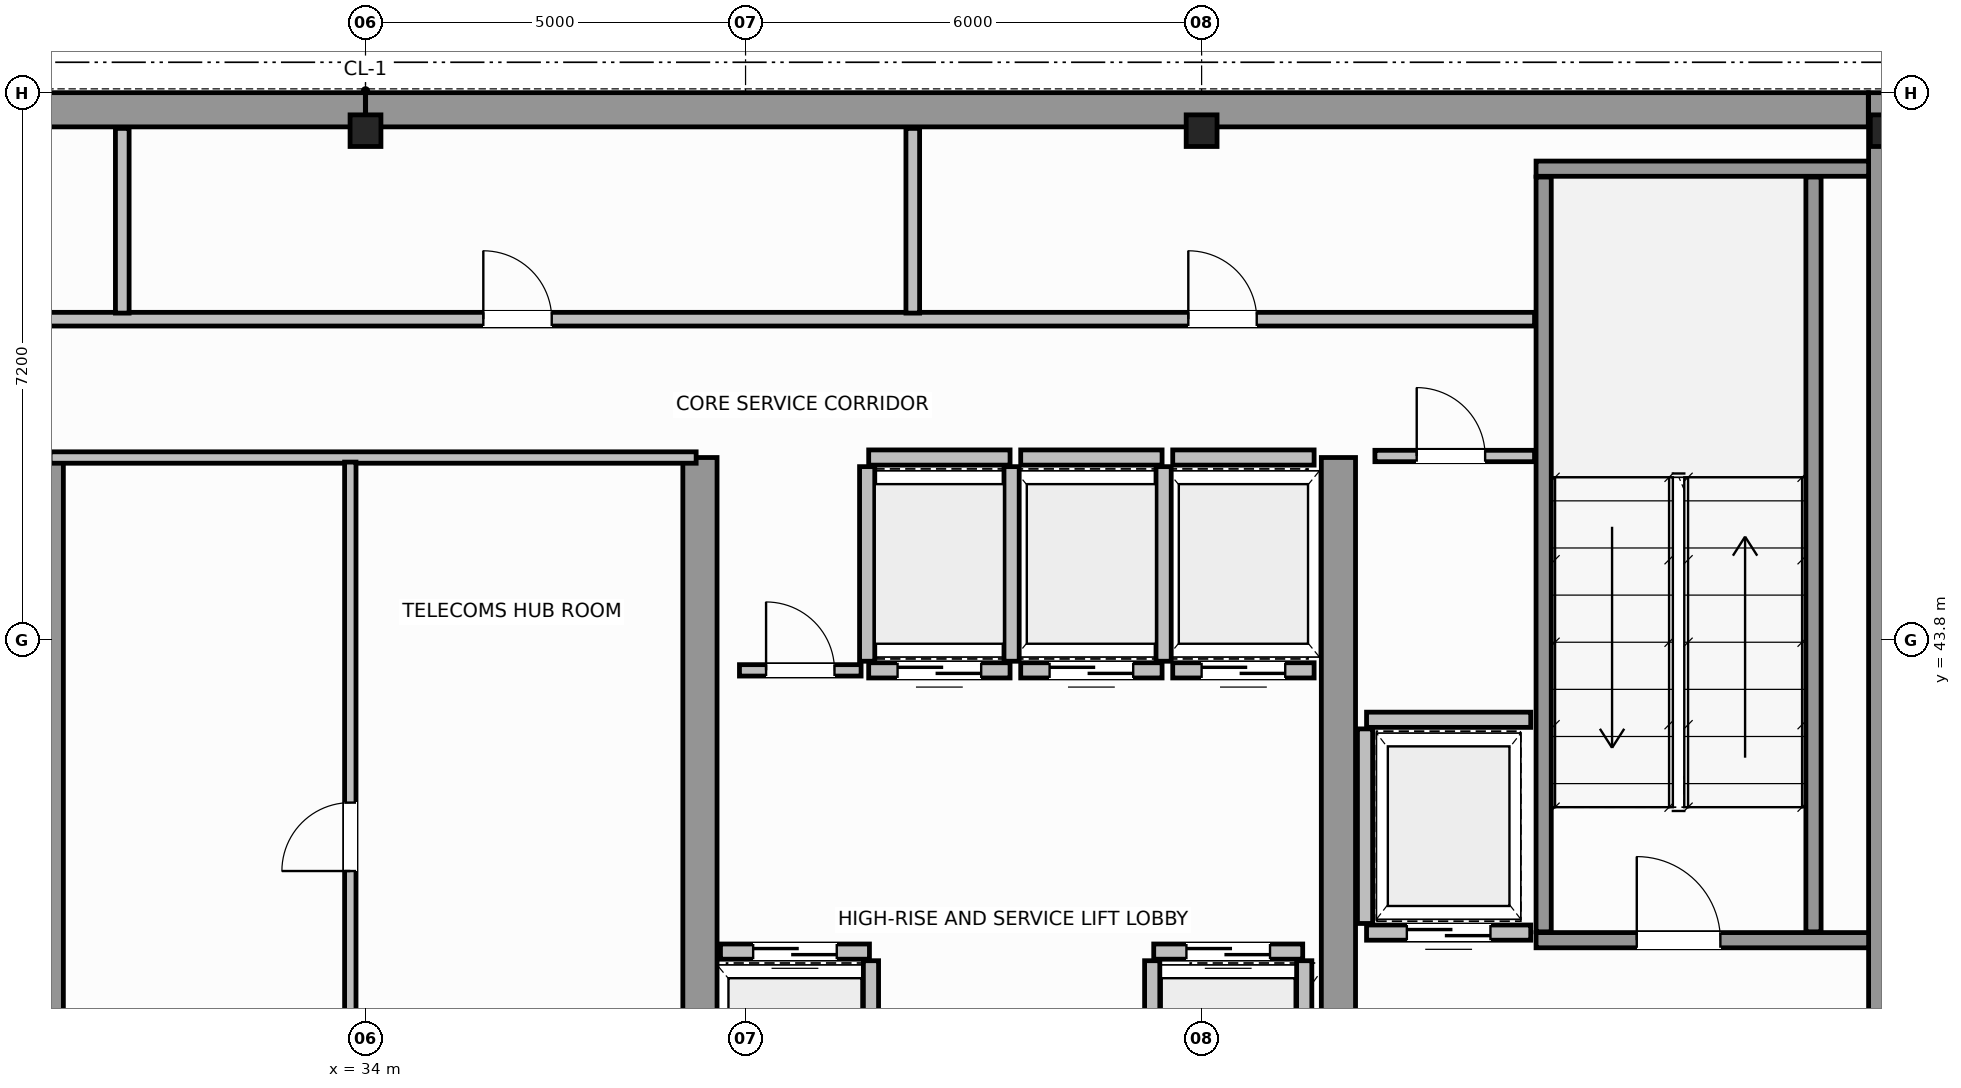
"""IFC4 building model, lengths in metres.
Left out: names, types, materials, properties, quantities, classifications, styles, units other than length and angle.
Written with IfcOpenShell. Run it as: python <this file> out.ifc"""

import sys

from ifc_helpers import new_model, si_unit, direction, frame, frame_2d, origin, origin_2d, place, context, subcontext, project, spatial, rectangle, i_section, extrude, source, transform, mapped, element, fill, save


model = new_model("IFC4")
c1 = context("Model", 3, precision=1e-05, world=origin(), true_north=direction((0.0, 1.0)))
c2 = subcontext(c1, "Body", "Model", "MODEL_VIEW")
j1 = project(units=[si_unit("LENGTHUNIT", "METRE"), si_unit("PLANEANGLEUNIT", "RADIAN")], contexts=[c1])
p1 = place(None, origin())
s1 = spatial("IfcSite", under=j1, at=p1, CompositionType="ELEMENT")
p2 = place(p1, origin())
s2 = spatial("IfcBuilding", under=s1, at=p2, CompositionType="ELEMENT")
p3 = place(p2, frame((0.0, 0.0, 299.2)))
s3 = spatial("IfcBuildingStorey", under=s2, at=p3, CompositionType="ELEMENT", Elevation=299.2)
m1 = source(origin(), c2, "Body", "SweptSolid", [
    extrude(i_section(OverallWidth=0.406, OverallDepth=0.416, WebThickness=0.03, FlangeThickness=0.042, FilletRadius=0.015, at=origin_2d()), origin(), (0.0, 0.0, 1.0), 4.6),
])
for number, where, z_axis, x_axis in (
    (1, (34.0, 50.5, 0.0), (0.0, 0.0, 1.0), (1.0, 0.0, 0.0)),
    (2, (45.0, 50.5, 0.0), (0.0, 0.0, 1.0), (1.0, 0.0, 0.0)),
    (3, (54.0, 50.5, 0.0), (0.0, 0.0, 1.0), (1.0, 0.0, 0.0)),
):
    element("IfcColumn", number, at=place(p3, frame(where, z_axis=z_axis, x_axis=x_axis)), inside=s3, PredefinedType="COLUMN", context=c2, shape_type="MappedRepresentation", body=[
        mapped(m1, transform((0.0, 0.0, 0.0), scale=1.0)),
    ])
for number, where, z_axis, x_axis in (
    (4, (14.229, 50.775, 0.0), (0.0, 0.0, 1.0), (1.0, 0.0, 0.0)),
    (5, (34.002, 50.775, 0.0), (0.0, 0.0, 1.0), (1.0, 0.0, 0.0)),
):
    element("IfcWall", number, at=place(p3, frame(where, z_axis=z_axis, x_axis=x_axis)), inside=s3, PredefinedType="SHEAR", context=c2, shape_type="SweptSolid", body=[
        extrude(rectangle(XDim=19.769, YDim=0.45, at=frame_2d((9.885, 0.0))), origin(), (0.0, 0.0, 1.0), 4.6),
    ])
p4 = place(p3, frame((54.0, 36.5, 0.0), z_axis=(0.0, 0.0, 1.0), x_axis=(0.0, 1.0, 0.0)))
e6 = element("IfcWall", 6, at=p4, inside=s3, PredefinedType="SHEAR", context=c2, shape_type="SweptSolid", body=[
    extrude(rectangle(XDim=14.5, YDim=0.45, at=frame_2d((7.25, 0.0))), origin(), (0.0, 0.0, 1.0), 4.6),
])
for number, where, z_axis, x_axis in (
    (7, (29.8, 36.745, 0.0), (0.0, 0.0, 1.0), (0.0, 1.0, 0.0)),
    (8, (38.4, 36.745, 0.0), (0.0, 0.0, 1.0), (0.0, 1.0, 0.0)),
    (9, (46.8, 36.745, 0.0), (0.0, 0.0, 1.0), (0.0, 1.0, 0.0)),
):
    element("IfcWall", number, at=place(p3, frame(where, z_axis=z_axis, x_axis=x_axis)), inside=s3, PredefinedType="SHEAR", context=c2, shape_type="SweptSolid", body=[
        extrude(rectangle(XDim=9.455, YDim=0.45, at=frame_2d((4.728, 0.0))), origin(), (0.0, 0.0, 1.0), 4.6),
    ])
p5 = place(p3, frame((49.4, 39.85, 0.0), z_axis=(0.0, 0.0, 1.0), x_axis=(1.0, 0.0, 0.0)))
e10 = element("IfcWall", 10, at=p5, inside=s3, PredefinedType="SOLIDWALL", context=c2, shape_type="SweptSolid", body=[
    extrude(rectangle(XDim=4.375, YDim=0.2, at=frame_2d((2.188, 0.0))), origin(), (0.0, 0.0, 1.0), 4.6),
])
p6 = place(p5, frame((1.325, 0.0, 0.0)))
e11 = element("IfcOpeningElement", 11, at=p6, cuts=e10, PredefinedType="OPENING", context=c2, shape_type="SweptSolid", body=[
    extrude(rectangle(XDim=1.1, YDim=2.15, at=frame_2d((0.55, 1.075))), frame((0.0, 0.11, 0.0), z_axis=(0.0, -1.0, 0.0), x_axis=(1.0, 0.0, 0.0)), (0.0, 0.0, 1.0), 0.22),
])
p7 = place(p3, frame((49.4, 50.0, 0.0), z_axis=(0.0, 0.0, 1.0), x_axis=(1.0, 0.0, 0.0)))
e12 = element("IfcWall", 12, at=p7, inside=s3, PredefinedType="SOLIDWALL", context=c2, shape_type="SweptSolid", body=[
    extrude(rectangle(XDim=4.375, YDim=0.2, at=frame_2d((2.188, 0.0))), origin(), (0.0, 0.0, 1.0), 4.6),
])
for number, where, z_axis, x_axis in (
    (13, (49.5, 39.96, 0.0), (0.0, 0.0, 1.0), (0.0, 1.0, 0.0)),
    (14, (53.05, 39.96, 0.0), (0.0, 0.0, 1.0), (0.0, 1.0, 0.0)),
):
    element("IfcWall", number, at=place(p3, frame(where, z_axis=z_axis, x_axis=x_axis)), inside=s3, PredefinedType="SOLIDWALL", context=c2, shape_type="SweptSolid", body=[
        extrude(rectangle(XDim=9.93, YDim=0.2, at=frame_2d((4.965, 0.0))), origin(), (0.0, 0.0, 1.0), 4.6),
    ])
p8 = place(p3, frame((38.67, 39.7, 0.0), z_axis=(0.0, 0.0, 1.0), x_axis=(1.0, 0.0, 0.0)))
e15 = element("IfcWall", 15, at=p8, inside=s3, PredefinedType="SOLIDWALL", context=c2, shape_type="SweptSolid", body=[
    extrude(rectangle(XDim=1.96, YDim=0.2, at=frame_2d((0.98, 0.0))), origin(), (0.0, 0.0, 1.0), 4.3),
])
p9 = place(p8, frame((0.43, 0.0, 0.0)))
e16 = element("IfcOpeningElement", 16, at=p9, cuts=e15, PredefinedType="OPENING", context=c2, shape_type="SweptSolid", body=[
    extrude(rectangle(XDim=1.1, YDim=2.15, at=frame_2d((0.55, 1.075))), frame((0.0, 0.11, 0.0), z_axis=(0.0, -1.0, 0.0), x_axis=(1.0, 0.0, 0.0)), (0.0, 0.0, 1.0), 0.22),
])
p10 = place(p3, frame((40.65, 37.02, 0.0), z_axis=(0.0, 0.0, 1.0), x_axis=(0.0, 1.0, 0.0)))
e17 = element("IfcWall", 17, at=p10, inside=s3, PredefinedType="SOLIDWALL", context=c2, shape_type="SweptSolid", body=[
    extrude(rectangle(XDim=2.56, YDim=0.2, at=frame_2d((1.28, 0.0))), origin(), (0.0, 0.0, 1.0), 4.3),
])
p11 = place(p3, frame((44.37, 39.7, 0.0), z_axis=(0.0, 0.0, 1.0), x_axis=(1.0, 0.0, 0.0)))
e18 = element("IfcWall", 18, at=p11, inside=s3, PredefinedType="SOLIDWALL", context=c2, shape_type="SweptSolid", body=[
    extrude(rectangle(XDim=1.96, YDim=0.2, at=frame_2d((0.98, 0.0))), origin(), (0.0, 0.0, 1.0), 4.3),
])
p12 = place(p11, frame((0.43, 0.0, 0.0)))
e19 = element("IfcOpeningElement", 19, at=p12, cuts=e18, PredefinedType="OPENING", context=c2, shape_type="SweptSolid", body=[
    extrude(rectangle(XDim=1.1, YDim=2.15, at=frame_2d((0.55, 1.075))), frame((0.0, 0.11, 0.0), z_axis=(0.0, -1.0, 0.0), x_axis=(1.0, 0.0, 0.0)), (0.0, 0.0, 1.0), 0.22),
])
for number, where, z_axis, x_axis in (
    (20, (44.35, 37.02, 0.0), (0.0, 0.0, 1.0), (0.0, 1.0, 0.0)),
    (21, (46.35, 37.02, 0.0), (0.0, 0.0, 1.0), (0.0, 1.0, 0.0)),
):
    element("IfcWall", number, at=place(p3, frame(where, z_axis=z_axis, x_axis=x_axis)), inside=s3, PredefinedType="SOLIDWALL", context=c2, shape_type="SweptSolid", body=[
        extrude(rectangle(XDim=2.56, YDim=0.2, at=frame_2d((1.28, 0.0))), origin(), (0.0, 0.0, 1.0), 4.3),
    ])
p13 = place(p3, frame((40.62, 43.4, 0.0), z_axis=(0.0, 0.0, 1.0), x_axis=(1.0, 0.0, 0.0)))
e22 = element("IfcWall", 22, at=p13, inside=s3, PredefinedType="SOLIDWALL", context=c2, shape_type="SweptSolid", body=[
    extrude(rectangle(XDim=1.86, YDim=0.2, at=frame_2d((0.93, 0.0))), origin(), (0.0, 0.0, 1.0), 4.3),
])
p14 = place(p13, frame((0.38, 0.0, 0.0)))
e23 = element("IfcOpeningElement", 23, at=p14, cuts=e22, PredefinedType="OPENING", context=c2, shape_type="SweptSolid", body=[
    extrude(rectangle(XDim=1.1, YDim=2.15, at=frame_2d((0.55, 1.075))), frame((0.0, 0.11, 0.0), z_axis=(0.0, -1.0, 0.0), x_axis=(1.0, 0.0, 0.0)), (0.0, 0.0, 1.0), 0.22),
])
p15 = place(p3, frame((40.62, 46.2, 0.0), z_axis=(0.0, 0.0, 1.0), x_axis=(1.0, 0.0, 0.0)))
e24 = element("IfcWall", 24, at=p15, inside=s3, PredefinedType="SOLIDWALL", context=c2, shape_type="SweptSolid", body=[
    extrude(rectangle(XDim=1.86, YDim=0.2, at=frame_2d((0.93, 0.0))), origin(), (0.0, 0.0, 1.0), 4.3),
])
for number, where, z_axis, x_axis in (
    (25, (40.6, 43.52, 0.0), (0.0, 0.0, 1.0), (0.0, 1.0, 0.0)),
    (26, (42.5, 43.52, 0.0), (0.0, 0.0, 1.0), (0.0, 1.0, 0.0)),
):
    element("IfcWall", number, at=place(p3, frame(where, z_axis=z_axis, x_axis=x_axis)), inside=s3, PredefinedType="SOLIDWALL", context=c2, shape_type="SweptSolid", body=[
        extrude(rectangle(XDim=2.56, YDim=0.2, at=frame_2d((1.28, 0.0))), origin(), (0.0, 0.0, 1.0), 4.3),
    ])
p16 = place(p3, frame((42.62, 43.4, 0.0), z_axis=(0.0, 0.0, 1.0), x_axis=(1.0, 0.0, 0.0)))
e27 = element("IfcWall", 27, at=p16, inside=s3, PredefinedType="SOLIDWALL", context=c2, shape_type="SweptSolid", body=[
    extrude(rectangle(XDim=1.86, YDim=0.2, at=frame_2d((0.93, 0.0))), origin(), (0.0, 0.0, 1.0), 4.3),
])
p17 = place(p16, frame((0.38, 0.0, 0.0)))
e28 = element("IfcOpeningElement", 28, at=p17, cuts=e27, PredefinedType="OPENING", context=c2, shape_type="SweptSolid", body=[
    extrude(rectangle(XDim=1.1, YDim=2.15, at=frame_2d((0.55, 1.075))), frame((0.0, 0.11, 0.0), z_axis=(0.0, -1.0, 0.0), x_axis=(1.0, 0.0, 0.0)), (0.0, 0.0, 1.0), 0.22),
])
p18 = place(p3, frame((42.62, 46.2, 0.0), z_axis=(0.0, 0.0, 1.0), x_axis=(1.0, 0.0, 0.0)))
e29 = element("IfcWall", 29, at=p18, inside=s3, PredefinedType="SOLIDWALL", context=c2, shape_type="SweptSolid", body=[
    extrude(rectangle(XDim=1.86, YDim=0.2, at=frame_2d((0.93, 0.0))), origin(), (0.0, 0.0, 1.0), 4.3),
])
p19 = place(p3, frame((44.5, 43.52, 0.0), z_axis=(0.0, 0.0, 1.0), x_axis=(0.0, 1.0, 0.0)))
e30 = element("IfcWall", 30, at=p19, inside=s3, PredefinedType="SOLIDWALL", context=c2, shape_type="SweptSolid", body=[
    extrude(rectangle(XDim=2.56, YDim=0.2, at=frame_2d((1.28, 0.0))), origin(), (0.0, 0.0, 1.0), 3.09),
])
p20 = place(p3, frame((44.62, 43.4, 0.0), z_axis=(0.0, 0.0, 1.0), x_axis=(1.0, 0.0, 0.0)))
e31 = element("IfcWall", 31, at=p20, inside=s3, PredefinedType="SOLIDWALL", context=c2, shape_type="SweptSolid", body=[
    extrude(rectangle(XDim=1.86, YDim=0.2, at=frame_2d((0.93, 0.0))), origin(), (0.0, 0.0, 1.0), 4.3),
])
p21 = place(p20, frame((0.38, 0.0, 0.0)))
e32 = element("IfcOpeningElement", 32, at=p21, cuts=e31, PredefinedType="OPENING", context=c2, shape_type="SweptSolid", body=[
    extrude(rectangle(XDim=1.1, YDim=2.15, at=frame_2d((0.55, 1.075))), frame((0.0, 0.11, 0.0), z_axis=(0.0, -1.0, 0.0), x_axis=(1.0, 0.0, 0.0)), (0.0, 0.0, 1.0), 0.22),
])
p22 = place(p3, frame((44.62, 46.2, 0.0), z_axis=(0.0, 0.0, 1.0), x_axis=(1.0, 0.0, 0.0)))
e33 = element("IfcWall", 33, at=p22, inside=s3, PredefinedType="SOLIDWALL", context=c2, shape_type="SweptSolid", body=[
    extrude(rectangle(XDim=1.86, YDim=0.2, at=frame_2d((0.93, 0.0))), origin(), (0.0, 0.0, 1.0), 4.3),
])
p23 = place(p3, frame((47.17, 39.95, 0.0), z_axis=(0.0, 0.0, 1.0), x_axis=(1.0, 0.0, 0.0)))
e34 = element("IfcWall", 34, at=p23, inside=s3, PredefinedType="SOLIDWALL", context=c2, shape_type="SweptSolid", body=[
    extrude(rectangle(XDim=2.16, YDim=0.2, at=frame_2d((1.08, 0.0))), origin(), (0.0, 0.0, 1.0), 4.3),
])
p24 = place(p23, frame((0.53, 0.0, 0.0)))
e35 = element("IfcOpeningElement", 35, at=p24, cuts=e34, PredefinedType="OPENING", context=c2, shape_type="SweptSolid", body=[
    extrude(rectangle(XDim=1.1, YDim=2.15, at=frame_2d((0.55, 1.075))), frame((0.0, 0.11, 0.0), z_axis=(0.0, -1.0, 0.0), x_axis=(1.0, 0.0, 0.0)), (0.0, 0.0, 1.0), 0.22),
])
p25 = place(p3, frame((47.17, 42.75, 0.0), z_axis=(0.0, 0.0, 1.0), x_axis=(1.0, 0.0, 0.0)))
e36 = element("IfcWall", 36, at=p25, inside=s3, PredefinedType="SOLIDWALL", context=c2, shape_type="SweptSolid", body=[
    extrude(rectangle(XDim=2.16, YDim=0.2, at=frame_2d((1.08, 0.0))), origin(), (0.0, 0.0, 1.0), 4.3),
])
p26 = place(p3, frame((47.15, 40.07, 0.0), z_axis=(0.0, 0.0, 1.0), x_axis=(0.0, 1.0, 0.0)))
e37 = element("IfcWall", 37, at=p26, inside=s3, PredefinedType="SOLIDWALL", context=c2, shape_type="SweptSolid", body=[
    extrude(rectangle(XDim=2.56, YDim=0.2, at=frame_2d((1.28, 0.0))), origin(), (0.0, 0.0, 1.0), 4.3),
])
p27 = place(p3, frame((29.85, 46.2, 0.0), z_axis=(0.0, 0.0, 1.0), x_axis=(1.0, 0.0, 0.0)))
e38 = element("IfcWall", 38, at=p27, inside=s3, PredefinedType="PARTITIONING", context=c2, shape_type="SweptSolid", body=[
    extrude(rectangle(XDim=8.5, YDim=0.15, at=frame_2d((4.25, 0.0))), origin(), (0.0, 0.0, 1.0), 4.3),
])
p28 = place(p3, frame((33.8, 36.56, 0.0), z_axis=(0.0, 0.0, 1.0), x_axis=(0.0, 1.0, 0.0)))
e39 = element("IfcWall", 39, at=p28, inside=s3, PredefinedType="PARTITIONING", context=c2, shape_type="SweptSolid", body=[
    extrude(rectangle(XDim=9.58, YDim=0.15, at=frame_2d((4.79, 0.0))), origin(), (0.0, 0.0, 1.0), 4.3),
])
p29 = place(p28, frame((4.2, 0.0, 0.0)))
e40 = element("IfcOpeningElement", 40, at=p29, cuts=e39, PredefinedType="OPENING", context=c2, shape_type="SweptSolid", body=[
    extrude(rectangle(XDim=0.9, YDim=2.1, at=frame_2d((0.45, 1.05))), frame((0.0, 0.085, 0.0), z_axis=(0.0, -1.0, 0.0), x_axis=(1.0, 0.0, 0.0)), (0.0, 0.0, 1.0), 0.17),
])
p30 = place(p3, frame((47.28, 46.22, 0.0), z_axis=(0.0, 0.0, 1.0), x_axis=(1.0, 0.0, 0.0)))
e41 = element("IfcWall", 41, at=p30, inside=s3, PredefinedType="PARTITIONING", context=c2, shape_type="SweptSolid", body=[
    extrude(rectangle(XDim=2.1, YDim=0.15, at=frame_2d((1.05, 0.0))), origin(), (0.0, 0.0, 1.0), 4.3),
])
p31 = place(p30, frame((0.55, 0.0, 0.0)))
e42 = element("IfcOpeningElement", 42, at=p31, cuts=e41, PredefinedType="OPENING", context=c2, shape_type="SweptSolid", body=[
    extrude(rectangle(XDim=0.9, YDim=2.1, at=frame_2d((0.45, 1.05))), frame((0.0, 0.085, 0.0), z_axis=(0.0, -1.0, 0.0), x_axis=(1.0, 0.0, 0.0)), (0.0, 0.0, 1.0), 0.17),
])
p32 = place(p3, frame((38.92, 43.4, 0.0), z_axis=(0.0, 0.0, 1.0), x_axis=(1.0, 0.0, 0.0)))
e43 = element("IfcWall", 43, at=p32, inside=s3, PredefinedType="PARTITIONING", context=c2, shape_type="SweptSolid", body=[
    extrude(rectangle(XDim=1.6, YDim=0.15, at=frame_2d((0.8, 0.0))), origin(), (0.0, 0.0, 1.0), 4.3),
])
p33 = place(p32, frame((0.35, 0.0, 0.0)))
e44 = element("IfcOpeningElement", 44, at=p33, cuts=e43, PredefinedType="OPENING", context=c2, shape_type="SweptSolid", body=[
    extrude(rectangle(XDim=0.9, YDim=2.1, at=frame_2d((0.45, 1.05))), frame((0.0, 0.085, 0.0), z_axis=(0.0, -1.0, 0.0), x_axis=(1.0, 0.0, 0.0)), (0.0, 0.0, 1.0), 0.17),
])
p34 = place(p3, frame((18.62, 48.02, 0.0), z_axis=(0.0, 0.0, 1.0), x_axis=(1.0, 0.0, 0.0)))
e45 = element("IfcWall", 45, at=p34, inside=s3, PredefinedType="PLUMBINGWALL", context=c2, shape_type="SweptSolid", body=[
    extrude(rectangle(XDim=30.76, YDim=0.18, at=frame_2d((15.38, 0.0))), origin(), (0.0, 0.0, 1.0), 4.3),
])
p35 = place(p34, frame((1.955, 0.0, 0.0)))
e46 = element("IfcOpeningElement", 46, at=p35, cuts=e45, PredefinedType="OPENING", context=c2, shape_type="SweptSolid", body=[
    extrude(rectangle(XDim=0.9, YDim=2.15, at=frame_2d((0.45, 1.075))), frame((0.0, 0.1, 0.0), z_axis=(0.0, -1.0, 0.0), x_axis=(1.0, 0.0, 0.0)), (0.0, 0.0, 1.0), 0.2),
])
p36 = place(p34, frame((8.03, 0.0, 0.0)))
e47 = element("IfcOpeningElement", 47, at=p36, cuts=e45, PredefinedType="OPENING", context=c2, shape_type="SweptSolid", body=[
    extrude(rectangle(XDim=0.9, YDim=2.15, at=frame_2d((0.45, 1.075))), frame((0.0, 0.1, 0.0), z_axis=(0.0, -1.0, 0.0), x_axis=(1.0, 0.0, 0.0)), (0.0, 0.0, 1.0), 0.2),
])
p37 = place(p34, frame((16.93, 0.0, 0.0)))
e48 = element("IfcOpeningElement", 48, at=p37, cuts=e45, PredefinedType="OPENING", context=c2, shape_type="SweptSolid", body=[
    extrude(rectangle(XDim=0.9, YDim=2.15, at=frame_2d((0.45, 1.075))), frame((0.0, 0.1, 0.0), z_axis=(0.0, -1.0, 0.0), x_axis=(1.0, 0.0, 0.0)), (0.0, 0.0, 1.0), 0.2),
])
p38 = place(p34, frame((26.205, 0.0, 0.0)))
e49 = element("IfcOpeningElement", 49, at=p38, cuts=e45, PredefinedType="OPENING", context=c2, shape_type="SweptSolid", body=[
    extrude(rectangle(XDim=0.9, YDim=2.15, at=frame_2d((0.45, 1.075))), frame((0.0, 0.1, 0.0), z_axis=(0.0, -1.0, 0.0), x_axis=(1.0, 0.0, 0.0)), (0.0, 0.0, 1.0), 0.2),
])
for number, where, z_axis, x_axis in (
    (50, (30.8, 48.1, 0.0), (0.0, 0.0, 1.0), (0.0, 1.0, 0.0)),
    (51, (41.2, 48.1, 0.0), (0.0, 0.0, 1.0), (0.0, 1.0, 0.0)),
):
    element("IfcWall", number, at=place(p3, frame(where, z_axis=z_axis, x_axis=x_axis)), inside=s3, PredefinedType="PLUMBINGWALL", context=c2, shape_type="SweptSolid", body=[
        extrude(rectangle(XDim=2.43, YDim=0.18, at=frame_2d((1.215, 0.0))), origin(), (0.0, 0.0, 1.0), 4.3),
    ])
m2 = source(origin(), c2, "Body", "SweptSolid", [
    extrude(rectangle(XDim=1.1, YDim=2.15, at=frame_2d((0.55, 1.075))), frame((0.0, 0.025, 0.0), z_axis=(0.0, -1.0, 0.0), x_axis=(1.0, 0.0, 0.0)), (0.0, 0.0, 1.0), 0.05),
])
p39 = place(p6, origin())
e52 = element("IfcDoor", 52, at=p39, inside=s3, OperationType="SINGLE_SWING_RIGHT", PredefinedType="DOOR", context=c2, shape_type="MappedRepresentation", body=[
    mapped(m2, transform((0.0, 0.0, 0.0), scale=1.0)),
])
fill(e11, e52)
p40 = place(p9, origin())
e53 = element("IfcDoor", 53, at=p40, inside=s3, OperationType="DOUBLE_DOOR_SLIDING", PredefinedType="DOOR", context=c2, shape_type="MappedRepresentation", body=[
    mapped(m2, transform((0.0, 0.0, 0.0), scale=1.0)),
])
fill(e16, e53)
p41 = place(p12, origin())
e54 = element("IfcDoor", 54, at=p41, inside=s3, OperationType="DOUBLE_DOOR_SLIDING", PredefinedType="DOOR", context=c2, shape_type="MappedRepresentation", body=[
    mapped(m2, transform((0.0, 0.0, 0.0), scale=1.0)),
])
fill(e19, e54)
p42 = place(p14, origin())
e55 = element("IfcDoor", 55, at=p42, inside=s3, OperationType="DOUBLE_DOOR_SLIDING", PredefinedType="DOOR", context=c2, shape_type="MappedRepresentation", body=[
    mapped(m2, transform((0.0, 0.0, 0.0), scale=1.0)),
])
fill(e23, e55)
p43 = place(p17, origin())
e56 = element("IfcDoor", 56, at=p43, inside=s3, OperationType="DOUBLE_DOOR_SLIDING", PredefinedType="DOOR", context=c2, shape_type="MappedRepresentation", body=[
    mapped(m2, transform((0.0, 0.0, 0.0), scale=1.0)),
])
fill(e28, e56)
p44 = place(p21, origin())
e57 = element("IfcDoor", 57, at=p44, inside=s3, OperationType="DOUBLE_DOOR_SLIDING", PredefinedType="DOOR", context=c2, shape_type="MappedRepresentation", body=[
    mapped(m2, transform((0.0, 0.0, 0.0), scale=1.0)),
])
fill(e32, e57)
p45 = place(p24, origin())
e58 = element("IfcDoor", 58, at=p45, inside=s3, OperationType="DOUBLE_DOOR_SLIDING", PredefinedType="DOOR", context=c2, shape_type="MappedRepresentation", body=[
    mapped(m2, transform((0.0, 0.0, 0.0), scale=1.0)),
])
fill(e35, e58)
m3 = source(origin(), c2, "Body", "SweptSolid", [
    extrude(rectangle(XDim=0.9, YDim=2.1, at=frame_2d((0.45, 1.05))), frame((0.0, 0.025, 0.0), z_axis=(0.0, -1.0, 0.0), x_axis=(1.0, 0.0, 0.0)), (0.0, 0.0, 1.0), 0.05),
])
p46 = place(p29, origin())
e59 = element("IfcDoor", 59, at=p46, inside=s3, OperationType="SINGLE_SWING_RIGHT", PredefinedType="DOOR", context=c2, shape_type="MappedRepresentation", body=[
    mapped(m3, transform((0.0, 0.0, 0.0), scale=1.0)),
])
fill(e40, e59)
p47 = place(p31, origin())
e60 = element("IfcDoor", 60, at=p47, inside=s3, OperationType="SINGLE_SWING_RIGHT", PredefinedType="DOOR", context=c2, shape_type="MappedRepresentation", body=[
    mapped(m3, transform((0.0, 0.0, 0.0), scale=1.0)),
])
fill(e42, e60)
p48 = place(p33, origin())
e61 = element("IfcDoor", 61, at=p48, inside=s3, OperationType="SINGLE_SWING_LEFT", PredefinedType="DOOR", context=c2, shape_type="MappedRepresentation", body=[
    mapped(m3, transform((0.0, 0.0, 0.0), scale=1.0)),
])
fill(e44, e61)
m4 = source(origin(), c2, "Body", "SweptSolid", [
    extrude(rectangle(XDim=0.9, YDim=2.15, at=frame_2d((0.45, 1.075))), frame((0.0, 0.025, 0.0), z_axis=(0.0, -1.0, 0.0), x_axis=(1.0, 0.0, 0.0)), (0.0, 0.0, 1.0), 0.05),
])
p49 = place(p37, origin())
e62 = element("IfcDoor", 62, at=p49, inside=s3, OperationType="SINGLE_SWING_LEFT", PredefinedType="DOOR", context=c2, shape_type="MappedRepresentation", body=[
    mapped(m4, transform((0.0, 0.0, 0.0), scale=1.0)),
])
fill(e48, e62)
p50 = place(p38, origin())
e63 = element("IfcDoor", 63, at=p50, inside=s3, OperationType="SINGLE_SWING_RIGHT", PredefinedType="DOOR", context=c2, shape_type="MappedRepresentation", body=[
    mapped(m4, transform((0.0, 0.0, 0.0), scale=1.0)),
])
fill(e49, e63)
save(model, sys.argv[1])
